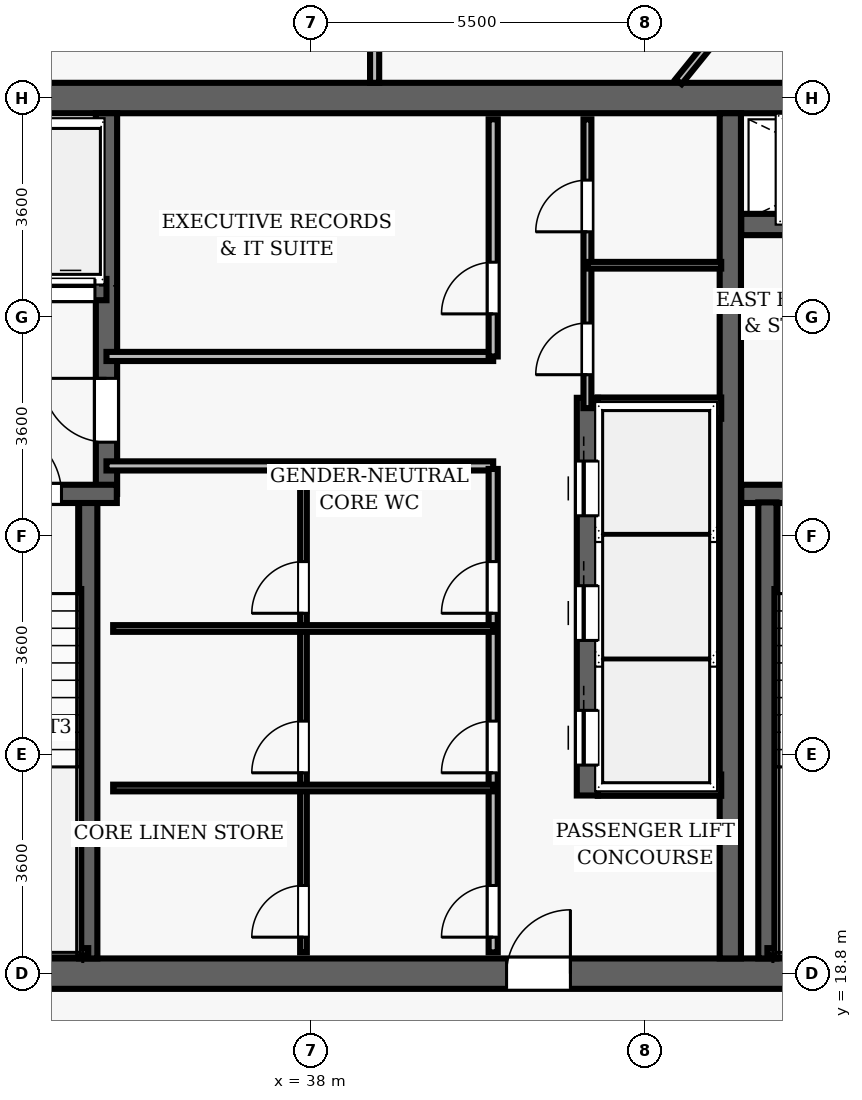
"""IFC4 building model, lengths in metres.
Left out: names, types, materials, properties, quantities, classifications, styles, units other than length and angle.
Written with IfcOpenShell. Run it as: python <this file> out.ifc"""

import sys

from ifc_helpers import new_model, si_unit, direction, frame, frame_2d, origin, place, context, subcontext, project, spatial, rectangle, extrude, element, fill, save


model = new_model("IFC4")
c1 = context("Model", 3, precision=1e-05, world=origin(), true_north=direction((0.0, 1.0)))
c2 = subcontext(c1, "Body", "Model", "MODEL_VIEW")
j1 = project(units=[si_unit("LENGTHUNIT", "METRE"), si_unit("PLANEANGLEUNIT", "RADIAN")], contexts=[c1])
p1 = place(None, origin())
s1 = spatial("IfcSite", under=j1, at=p1, CompositionType="ELEMENT")
p2 = place(p1, origin())
s2 = spatial("IfcBuilding", under=s1, at=p2, CompositionType="ELEMENT")
p3 = place(p2, frame((0.0, 0.0, 245.9)))
s3 = spatial("IfcBuildingStorey", under=s2, at=p3, CompositionType="ELEMENT", Elevation=245.9)
p4 = place(p3, frame((26.75, 18.8, 0.0), z_axis=(0.0, 0.0, 1.0), x_axis=(1.0, 0.0, 0.0)))
e1 = element("IfcWall", 1, at=p4, inside=s3, PredefinedType="SHEAR", context=c2, shape_type="SweptSolid", body=[
    extrude(rectangle(XDim=22.5, YDim=0.5, at=frame_2d((11.25, 0.0))), origin(), (0.0, 0.0, 1.0), 3.85),
])
p5 = place(p4, frame((14.47, 0.0, 0.0)))
e2 = element("IfcOpeningElement", 2, at=p5, cuts=e1, PredefinedType="OPENING", context=c2, shape_type="SweptSolid", body=[
    extrude(rectangle(XDim=1.05, YDim=2.15, at=frame_2d((0.525, 1.075))), frame((0.0, 0.26, 0.0), z_axis=(0.0, -1.0, 0.0), x_axis=(1.0, 0.0, 0.0)), (0.0, 0.0, 1.0), 0.52),
])
p6 = place(p3, frame((26.75, 33.2, 0.0), z_axis=(0.0, 0.0, 1.0), x_axis=(1.0, 0.0, 0.0)))
e3 = element("IfcWall", 3, at=p6, inside=s3, PredefinedType="SHEAR", context=c2, shape_type="SweptSolid", body=[
    extrude(rectangle(XDim=22.5, YDim=0.5, at=frame_2d((11.25, 0.0))), origin(), (0.0, 0.0, 1.0), 3.85),
])
p7 = place(p3, frame((44.9, 19.05, 0.0), z_axis=(0.0, 0.0, 1.0), x_axis=(0.0, 1.0, 0.0)))
e4 = element("IfcWall", 4, at=p7, inside=s3, PredefinedType="SHEAR", context=c2, shape_type="SweptSolid", body=[
    extrude(rectangle(XDim=13.9, YDim=0.35, at=frame_2d((6.95, 0.0))), origin(), (0.0, 0.0, 1.0), 3.85),
])
p8 = place(p3, frame((45.08, 26.69, 0.0), z_axis=(0.0, 0.0, 1.0), x_axis=(1.0, 0.0, 0.0)))
e5 = element("IfcWall", 5, at=p8, inside=s3, PredefinedType="SHEAR", context=c2, shape_type="SweptSolid", body=[
    extrude(rectangle(XDim=3.67, YDim=0.3, at=frame_2d((1.835, 0.0))), origin(), (0.0, 0.0, 1.0), 3.85),
])
p9 = place(p8, frame((1.05, 0.0, 0.0)))
e6 = element("IfcOpeningElement", 6, at=p9, cuts=e5, PredefinedType="OPENING", context=c2, shape_type="SweptSolid", body=[
    extrude(rectangle(XDim=1.1, YDim=2.15, at=frame_2d((0.55, 1.075))), frame((0.0, 0.16, 0.0), z_axis=(0.0, -1.0, 0.0), x_axis=(1.0, 0.0, 0.0)), (0.0, 0.0, 1.0), 0.32),
])
p10 = place(p3, frame((45.51, 19.05, 0.0), z_axis=(0.0, 0.0, 1.0), x_axis=(0.0, 1.0, 0.0)))
e7 = element("IfcWall", 7, at=p10, inside=s3, PredefinedType="SHEAR", context=c2, shape_type="SweptSolid", body=[
    extrude(rectangle(XDim=7.5, YDim=0.3, at=frame_2d((3.75, 0.0))), origin(), (0.0, 0.0, 1.0), 3.85),
])
p11 = place(p3, frame((45.51, 19.16, 0.0), z_axis=(0.0, 0.0, 1.0), x_axis=(1.0, 0.0, 0.0)))
e8 = element("IfcWall", 8, at=p11, inside=s3, PredefinedType="SHEAR", context=c2, shape_type="SweptSolid", body=[
    extrude(rectangle(XDim=3.095, YDim=0.12, at=frame_2d((1.547, 0.0))), origin(), (0.0, 0.0, 1.0), 3.85),
])
p12 = place(p3, frame((45.08, 31.12, 0.0), z_axis=(0.0, 0.0, 1.0), x_axis=(1.0, 0.0, 0.0)))
e9 = element("IfcWall", 9, at=p12, inside=s3, PredefinedType="SHEAR", context=c2, shape_type="SweptSolid", body=[
    extrude(rectangle(XDim=3.67, YDim=0.35, at=frame_2d((1.835, 0.0))), origin(), (0.0, 0.0, 1.0), 3.04),
])
p13 = place(p12, frame((1.25, 0.0, 0.0)))
e10 = element("IfcOpeningElement", 10, at=p13, cuts=e9, PredefinedType="OPENING", context=c2, shape_type="SweptSolid", body=[
    extrude(rectangle(XDim=1.1, YDim=2.15, at=frame_2d((0.55, 1.075))), frame((0.0, 0.185, 0.0), z_axis=(0.0, -1.0, 0.0), x_axis=(1.0, 0.0, 0.0)), (0.0, 0.0, 1.0), 0.37),
])
p14 = place(p3, frame((34.34, 19.05, 0.0), z_axis=(0.0, 0.0, 1.0), x_axis=(0.0, 1.0, 0.0)))
e11 = element("IfcWall", 11, at=p14, inside=s3, PredefinedType="SHEAR", context=c2, shape_type="SweptSolid", body=[
    extrude(rectangle(XDim=7.5, YDim=0.3, at=frame_2d((3.75, 0.0))), origin(), (0.0, 0.0, 1.0), 3.85),
])
p15 = place(p3, frame((34.64, 26.69, 0.0), z_axis=(0.0, 0.0, 1.0), x_axis=(0.0, 1.0, 0.0)))
e12 = element("IfcWall", 12, at=p15, inside=s3, PredefinedType="SHEAR", context=c2, shape_type="SweptSolid", body=[
    extrude(rectangle(XDim=6.26, YDim=0.35, at=frame_2d((3.13, 0.0))), origin(), (0.0, 0.0, 1.0), 3.85),
])
p16 = place(p15, frame((0.85, 0.0, 0.0)))
e13 = element("IfcOpeningElement", 13, at=p16, cuts=e12, PredefinedType="OPENING", context=c2, shape_type="SweptSolid", body=[
    extrude(rectangle(XDim=1.05, YDim=2.15, at=frame_2d((0.525, 1.075))), frame((0.0, 0.185, 0.0), z_axis=(0.0, -1.0, 0.0), x_axis=(1.0, 0.0, 0.0)), (0.0, 0.0, 1.0), 0.37),
])
p17 = place(p3, frame((31.25, 26.69, 0.0), z_axis=(0.0, 0.0, 1.0), x_axis=(1.0, 0.0, 0.0)))
e14 = element("IfcWall", 14, at=p17, inside=s3, PredefinedType="SHEAR", context=c2, shape_type="SweptSolid", body=[
    extrude(rectangle(XDim=3.56, YDim=0.3, at=frame_2d((1.78, 0.0))), origin(), (0.0, 0.0, 1.0), 3.85),
])
p18 = place(p17, frame((1.55, 0.0, 0.0)))
e15 = element("IfcOpeningElement", 15, at=p18, cuts=e14, PredefinedType="OPENING", context=c2, shape_type="SweptSolid", body=[
    extrude(rectangle(XDim=1.1, YDim=2.15, at=frame_2d((0.55, 1.075))), frame((0.0, 0.16, 0.0), z_axis=(0.0, -1.0, 0.0), x_axis=(1.0, 0.0, 0.0)), (0.0, 0.0, 1.0), 0.32),
])
p19 = place(p3, frame((31.3, 19.16, 0.0), z_axis=(0.0, 0.0, 1.0), x_axis=(1.0, 0.0, 0.0)))
e16 = element("IfcWall", 16, at=p19, inside=s3, PredefinedType="SHEAR", context=c2, shape_type="SweptSolid", body=[
    extrude(rectangle(XDim=3.04, YDim=0.12, at=frame_2d((1.52, 0.0))), origin(), (0.0, 0.0, 1.0), 3.85),
])
p20 = place(p3, frame((32.23, 30.05, 0.0), z_axis=(0.0, 0.0, 1.0), x_axis=(1.0, 0.0, 0.0)))
e17 = element("IfcWall", 17, at=p20, inside=s3, PredefinedType="SHEAR", context=c2, shape_type="SweptSolid", body=[
    extrude(rectangle(XDim=2.41, YDim=0.35, at=frame_2d((1.205, 0.0))), origin(), (0.0, 0.0, 1.0), 3.04),
])
p21 = place(p20, frame((0.42, 0.0, 0.0)))
e18 = element("IfcOpeningElement", 18, at=p21, cuts=e17, PredefinedType="OPENING", context=c2, shape_type="SweptSolid", body=[
    extrude(rectangle(XDim=0.8, YDim=2.15, at=frame_2d((0.4, 1.075))), frame((0.0, 0.185, 0.0), z_axis=(0.0, -1.0, 0.0), x_axis=(1.0, 0.0, 0.0)), (0.0, 0.0, 1.0), 0.37),
])
p22 = place(p20, frame((1.42, 0.0, 0.0)))
e19 = element("IfcOpeningElement", 19, at=p22, cuts=e17, PredefinedType="OPENING", context=c2, shape_type="SweptSolid", body=[
    extrude(rectangle(XDim=0.8, YDim=2.15, at=frame_2d((0.4, 1.075))), frame((0.0, 0.185, 0.0), z_axis=(0.0, -1.0, 0.0), x_axis=(1.0, 0.0, 0.0)), (0.0, 0.0, 1.0), 0.37),
])
p23 = place(p3, frame((42.55, 21.73, 0.0), z_axis=(0.0, 0.0, 1.0), x_axis=(0.0, 1.0, 0.0)))
e20 = element("IfcWall", 20, at=p23, inside=s3, PredefinedType="SHEAR", context=c2, shape_type="SweptSolid", body=[
    extrude(rectangle(XDim=6.54, YDim=0.35, at=frame_2d((3.27, 0.0))), origin(), (0.0, 0.0, 1.0), 3.04),
])
p24 = place(p23, frame((0.5, 0.0, 0.0)))
e21 = element("IfcOpeningElement", 21, at=p24, cuts=e20, PredefinedType="OPENING", context=c2, shape_type="SweptSolid", body=[
    extrude(rectangle(XDim=0.9, YDim=2.15, at=frame_2d((0.45, 1.075))), frame((0.0, 0.185, 0.0), z_axis=(0.0, -1.0, 0.0), x_axis=(1.0, 0.0, 0.0)), (0.0, 0.0, 1.0), 0.37),
])
p25 = place(p23, frame((2.55, 0.0, 0.0)))
e22 = element("IfcOpeningElement", 22, at=p25, cuts=e20, PredefinedType="OPENING", context=c2, shape_type="SweptSolid", body=[
    extrude(rectangle(XDim=0.9, YDim=2.15, at=frame_2d((0.45, 1.075))), frame((0.0, 0.185, 0.0), z_axis=(0.0, -1.0, 0.0), x_axis=(1.0, 0.0, 0.0)), (0.0, 0.0, 1.0), 0.37),
])
p26 = place(p23, frame((4.6, 0.0, 0.0)))
e23 = element("IfcOpeningElement", 23, at=p26, cuts=e20, PredefinedType="OPENING", context=c2, shape_type="SweptSolid", body=[
    extrude(rectangle(XDim=0.9, YDim=2.15, at=frame_2d((0.45, 1.075))), frame((0.0, 0.185, 0.0), z_axis=(0.0, -1.0, 0.0), x_axis=(1.0, 0.0, 0.0)), (0.0, 0.0, 1.0), 0.37),
])
for number, where, z_axis, x_axis in (
    (24, (42.72, 21.9, 0.0), (0.0, 0.0, 1.0), (1.0, 0.0, 0.0)),
    (25, (42.72, 28.1, 0.0), (0.0, 0.0, 1.0), (1.0, 0.0, 0.0)),
):
    element("IfcWall", number, at=place(p3, frame(where, z_axis=z_axis, x_axis=x_axis)), inside=s3, PredefinedType="SHEAR", context=c2, shape_type="SweptSolid", body=[
        extrude(rectangle(XDim=2.03, YDim=0.35, at=frame_2d((1.015, 0.0))), origin(), (0.0, 0.0, 1.0), 3.04),
    ])
for number, where, z_axis, x_axis in (
    (26, (34.64, 27.15, 0.0), (0.0, 0.0, 1.0), (1.0, 0.0, 0.0)),
    (27, (34.64, 28.95, 0.0), (0.0, 0.0, 1.0), (1.0, 0.0, 0.0)),
):
    element("IfcWall", number, at=place(p3, frame(where, z_axis=z_axis, x_axis=x_axis)), inside=s3, PredefinedType="PARTITIONING", context=c2, shape_type="SweptSolid", body=[
        extrude(rectangle(XDim=6.36, YDim=0.15, at=frame_2d((3.18, 0.0))), origin(), (0.0, 0.0, 1.0), 3.04),
    ])
p27 = place(p3, frame((41.0, 28.95, 0.0), z_axis=(0.0, 0.0, 1.0), x_axis=(0.0, 1.0, 0.0)))
e28 = element("IfcWall", 28, at=p27, inside=s3, PredefinedType="PARTITIONING", context=c2, shape_type="SweptSolid", body=[
    extrude(rectangle(XDim=3.9, YDim=0.15, at=frame_2d((1.95, 0.0))), origin(), (0.0, 0.0, 1.0), 3.04),
])
p28 = place(p27, frame((0.7, 0.0, 0.0)))
e29 = element("IfcOpeningElement", 29, at=p28, cuts=e28, PredefinedType="OPENING", context=c2, shape_type="SweptSolid", body=[
    extrude(rectangle(XDim=0.85, YDim=2.1, at=frame_2d((0.425, 1.05))), frame((0.0, 0.085, 0.0), z_axis=(0.0, -1.0, 0.0), x_axis=(1.0, 0.0, 0.0)), (0.0, 0.0, 1.0), 0.17),
])
p29 = place(p3, frame((41.0, 19.15, 0.0), z_axis=(0.0, 0.0, 1.0), x_axis=(0.0, 1.0, 0.0)))
e30 = element("IfcWall", 30, at=p29, inside=s3, PredefinedType="PARTITIONING", context=c2, shape_type="SweptSolid", body=[
    extrude(rectangle(XDim=7.95, YDim=0.15, at=frame_2d((3.975, 0.0))), origin(), (0.0, 0.0, 1.0), 3.04),
])
p30 = place(p29, frame((0.25, 0.0, 0.0)))
e31 = element("IfcOpeningElement", 31, at=p30, cuts=e30, PredefinedType="OPENING", context=c2, shape_type="SweptSolid", body=[
    extrude(rectangle(XDim=0.85, YDim=2.1, at=frame_2d((0.425, 1.05))), frame((0.0, 0.085, 0.0), z_axis=(0.0, -1.0, 0.0), x_axis=(1.0, 0.0, 0.0)), (0.0, 0.0, 1.0), 0.17),
])
p31 = place(p29, frame((2.953, 0.0, 0.0)))
e32 = element("IfcOpeningElement", 32, at=p31, cuts=e30, PredefinedType="OPENING", context=c2, shape_type="SweptSolid", body=[
    extrude(rectangle(XDim=0.85, YDim=2.1, at=frame_2d((0.425, 1.05))), frame((0.0, 0.085, 0.0), z_axis=(0.0, -1.0, 0.0), x_axis=(1.0, 0.0, 0.0)), (0.0, 0.0, 1.0), 0.17),
])
p32 = place(p29, frame((5.576, 0.0, 0.0)))
e33 = element("IfcOpeningElement", 33, at=p32, cuts=e30, PredefinedType="OPENING", context=c2, shape_type="SweptSolid", body=[
    extrude(rectangle(XDim=0.85, YDim=2.1, at=frame_2d((0.425, 1.05))), frame((0.0, 0.085, 0.0), z_axis=(0.0, -1.0, 0.0), x_axis=(1.0, 0.0, 0.0)), (0.0, 0.0, 1.0), 0.17),
])
p33 = place(p3, frame((37.88, 19.15, 0.0), z_axis=(0.0, 0.0, 1.0), x_axis=(0.0, 1.0, 0.0)))
e34 = element("IfcWall", 34, at=p33, inside=s3, PredefinedType="PARTITIONING", context=c2, shape_type="SweptSolid", body=[
    extrude(rectangle(XDim=7.95, YDim=0.11, at=frame_2d((3.975, 0.0))), origin(), (0.0, 0.0, 1.0), 3.04),
])
p34 = place(p33, frame((0.25, 0.0, 0.0)))
e35 = element("IfcOpeningElement", 35, at=p34, cuts=e34, PredefinedType="OPENING", context=c2, shape_type="SweptSolid", body=[
    extrude(rectangle(XDim=0.85, YDim=2.1, at=frame_2d((0.425, 1.05))), frame((0.0, 0.065, 0.0), z_axis=(0.0, -1.0, 0.0), x_axis=(1.0, 0.0, 0.0)), (0.0, 0.0, 1.0), 0.13),
])
p35 = place(p33, frame((2.953, 0.0, 0.0)))
e36 = element("IfcOpeningElement", 36, at=p35, cuts=e34, PredefinedType="OPENING", context=c2, shape_type="SweptSolid", body=[
    extrude(rectangle(XDim=0.85, YDim=2.1, at=frame_2d((0.425, 1.05))), frame((0.0, 0.065, 0.0), z_axis=(0.0, -1.0, 0.0), x_axis=(1.0, 0.0, 0.0)), (0.0, 0.0, 1.0), 0.13),
])
p36 = place(p33, frame((5.576, 0.0, 0.0)))
e37 = element("IfcOpeningElement", 37, at=p36, cuts=e34, PredefinedType="OPENING", context=c2, shape_type="SweptSolid", body=[
    extrude(rectangle(XDim=0.85, YDim=2.1, at=frame_2d((0.425, 1.05))), frame((0.0, 0.065, 0.0), z_axis=(0.0, -1.0, 0.0), x_axis=(1.0, 0.0, 0.0)), (0.0, 0.0, 1.0), 0.13),
])
for number, where, z_axis, x_axis in (
    (38, (34.75, 21.853, 0.0), (0.0, 0.0, 1.0), (1.0, 0.0, 0.0)),
    (39, (34.75, 24.477, 0.0), (0.0, 0.0, 1.0), (1.0, 0.0, 0.0)),
):
    element("IfcWall", number, at=place(p3, frame(where, z_axis=z_axis, x_axis=x_axis)), inside=s3, PredefinedType="PARTITIONING", context=c2, shape_type="SweptSolid", body=[
        extrude(rectangle(XDim=6.25, YDim=0.11, at=frame_2d((3.125, 0.0))), origin(), (0.0, 0.0, 1.0), 3.04),
    ])
p37 = place(p3, frame((42.55, 28.1, 0.0), z_axis=(0.0, 0.0, 1.0), x_axis=(0.0, 1.0, 0.0)))
e40 = element("IfcWall", 40, at=p37, inside=s3, PredefinedType="PARTITIONING", context=c2, shape_type="SweptSolid", body=[
    extrude(rectangle(XDim=4.75, YDim=0.13, at=frame_2d((2.375, 0.0))), origin(), (0.0, 0.0, 1.0), 3.04),
])
p38 = place(p37, frame((0.55, 0.0, 0.0)))
e41 = element("IfcOpeningElement", 41, at=p38, cuts=e40, PredefinedType="OPENING", context=c2, shape_type="SweptSolid", body=[
    extrude(rectangle(XDim=0.85, YDim=2.1, at=frame_2d((0.425, 1.05))), frame((0.0, 0.075, 0.0), z_axis=(0.0, -1.0, 0.0), x_axis=(1.0, 0.0, 0.0)), (0.0, 0.0, 1.0), 0.15),
])
p39 = place(p37, frame((2.9, 0.0, 0.0)))
e42 = element("IfcOpeningElement", 42, at=p39, cuts=e40, PredefinedType="OPENING", context=c2, shape_type="SweptSolid", body=[
    extrude(rectangle(XDim=0.85, YDim=2.1, at=frame_2d((0.425, 1.05))), frame((0.0, 0.075, 0.0), z_axis=(0.0, -1.0, 0.0), x_axis=(1.0, 0.0, 0.0)), (0.0, 0.0, 1.0), 0.15),
])
p40 = place(p3, frame((42.55, 30.45, 0.0), z_axis=(0.0, 0.0, 1.0), x_axis=(1.0, 0.0, 0.0)))
e43 = element("IfcWall", 43, at=p40, inside=s3, PredefinedType="PARTITIONING", context=c2, shape_type="SweptSolid", body=[
    extrude(rectangle(XDim=2.2, YDim=0.11, at=frame_2d((1.1, 0.0))), origin(), (0.0, 0.0, 1.0), 3.04),
])
p41 = place(p3, frame((39.05, 33.45, 0.0), z_axis=(0.0, 0.0, 1.0), x_axis=(0.0, 1.0, 0.0)))
e44 = element("IfcWall", 44, at=p41, inside=s3, PredefinedType="PARTITIONING", context=c2, shape_type="SweptSolid", body=[
    extrude(rectangle(XDim=6.95, YDim=0.15, at=frame_2d((3.475, 0.0))), origin(), (0.0, 0.0, 1.0), 3.04),
])
p42 = place(p41, frame((1.262, 0.0, 0.0)))
e45 = element("IfcOpeningElement", 45, at=p42, cuts=e44, PredefinedType="OPENING", context=c2, shape_type="SweptSolid", body=[
    extrude(rectangle(XDim=0.95, YDim=2.15, at=frame_2d((0.475, 1.075))), frame((0.0, 0.085, 0.0), z_axis=(0.0, -1.0, 0.0), x_axis=(1.0, 0.0, 0.0)), (0.0, 0.0, 1.0), 0.17),
])
p43 = place(p3, frame((44.049, 33.47, 0.0), z_axis=(0.0, 0.0, 1.0), x_axis=(0.629319722443, 0.777146502883, 0.0)))
e46 = element("IfcWall", 46, at=p43, inside=s3, PredefinedType="PARTITIONING", context=c2, shape_type="SweptSolid", body=[
    extrude(rectangle(XDim=7.803, YDim=0.13, at=frame_2d((3.902, 0.0))), origin(), (0.0, 0.0, 1.0), 3.04),
])
p44 = place(p18, origin())
e47 = element("IfcDoor", 47, at=p44, inside=s3, OperationType="SINGLE_SWING_LEFT", PredefinedType="DOOR", context=c2, shape_type="SweptSolid", body=[
    extrude(rectangle(XDim=1.1, YDim=2.15, at=frame_2d((0.55, 1.075))), frame((0.0, 0.025, 0.0), z_axis=(0.0, -1.0, 0.0), x_axis=(1.0, 0.0, 0.0)), (0.0, 0.0, 1.0), 0.05),
])
fill(e15, e47)
p45 = place(p5, origin())
e48 = element("IfcDoor", 48, at=p45, inside=s3, OperationType="SINGLE_SWING_RIGHT", PredefinedType="DOOR", context=c2, shape_type="SweptSolid", body=[
    extrude(rectangle(XDim=1.05, YDim=2.15, at=frame_2d((0.525, 1.075))), frame((0.0, 0.025, 0.0), z_axis=(0.0, -1.0, 0.0), x_axis=(1.0, 0.0, 0.0)), (0.0, 0.0, 1.0), 0.05),
])
fill(e2, e48)
p46 = place(p16, origin())
e49 = element("IfcDoor", 49, at=p46, inside=s3, OperationType="SINGLE_SWING_RIGHT", PredefinedType="DOOR", context=c2, shape_type="SweptSolid", body=[
    extrude(rectangle(XDim=1.05, YDim=2.15, at=frame_2d((0.525, 1.075))), frame((0.0, 0.025, 0.0), z_axis=(0.0, -1.0, 0.0), x_axis=(1.0, 0.0, 0.0)), (0.0, 0.0, 1.0), 0.05),
])
fill(e13, e49)
p47 = place(p28, origin())
e50 = element("IfcDoor", 50, at=p47, inside=s3, OperationType="SINGLE_SWING_LEFT", PredefinedType="DOOR", context=c2, shape_type="SweptSolid", body=[
    extrude(rectangle(XDim=0.85, YDim=2.1, at=frame_2d((0.425, 1.05))), frame((0.0, 0.025, 0.0), z_axis=(0.0, -1.0, 0.0), x_axis=(1.0, 0.0, 0.0)), (0.0, 0.0, 1.0), 0.05),
])
fill(e29, e50)
p48 = place(p30, origin())
e51 = element("IfcDoor", 51, at=p48, inside=s3, OperationType="SINGLE_SWING_LEFT", PredefinedType="DOOR", context=c2, shape_type="SweptSolid", body=[
    extrude(rectangle(XDim=0.85, YDim=2.1, at=frame_2d((0.425, 1.05))), frame((0.0, 0.025, 0.0), z_axis=(0.0, -1.0, 0.0), x_axis=(1.0, 0.0, 0.0)), (0.0, 0.0, 1.0), 0.05),
])
fill(e31, e51)
p49 = place(p34, origin())
e52 = element("IfcDoor", 52, at=p49, inside=s3, OperationType="SINGLE_SWING_LEFT", PredefinedType="DOOR", context=c2, shape_type="SweptSolid", body=[
    extrude(rectangle(XDim=0.85, YDim=2.1, at=frame_2d((0.425, 1.05))), frame((0.0, 0.025, 0.0), z_axis=(0.0, -1.0, 0.0), x_axis=(1.0, 0.0, 0.0)), (0.0, 0.0, 1.0), 0.05),
])
fill(e35, e52)
p50 = place(p31, origin())
e53 = element("IfcDoor", 53, at=p50, inside=s3, OperationType="SINGLE_SWING_LEFT", PredefinedType="DOOR", context=c2, shape_type="SweptSolid", body=[
    extrude(rectangle(XDim=0.85, YDim=2.1, at=frame_2d((0.425, 1.05))), frame((0.0, 0.025, 0.0), z_axis=(0.0, -1.0, 0.0), x_axis=(1.0, 0.0, 0.0)), (0.0, 0.0, 1.0), 0.05),
])
fill(e32, e53)
p51 = place(p35, origin())
e54 = element("IfcDoor", 54, at=p51, inside=s3, OperationType="SINGLE_SWING_LEFT", PredefinedType="DOOR", context=c2, shape_type="SweptSolid", body=[
    extrude(rectangle(XDim=0.85, YDim=2.1, at=frame_2d((0.425, 1.05))), frame((0.0, 0.025, 0.0), z_axis=(0.0, -1.0, 0.0), x_axis=(1.0, 0.0, 0.0)), (0.0, 0.0, 1.0), 0.05),
])
fill(e36, e54)
p52 = place(p32, origin())
e55 = element("IfcDoor", 55, at=p52, inside=s3, OperationType="SINGLE_SWING_LEFT", PredefinedType="DOOR", context=c2, shape_type="SweptSolid", body=[
    extrude(rectangle(XDim=0.85, YDim=2.1, at=frame_2d((0.425, 1.05))), frame((0.0, 0.025, 0.0), z_axis=(0.0, -1.0, 0.0), x_axis=(1.0, 0.0, 0.0)), (0.0, 0.0, 1.0), 0.05),
])
fill(e33, e55)
p53 = place(p36, origin())
e56 = element("IfcDoor", 56, at=p53, inside=s3, OperationType="SINGLE_SWING_LEFT", PredefinedType="DOOR", context=c2, shape_type="SweptSolid", body=[
    extrude(rectangle(XDim=0.85, YDim=2.1, at=frame_2d((0.425, 1.05))), frame((0.0, 0.025, 0.0), z_axis=(0.0, -1.0, 0.0), x_axis=(1.0, 0.0, 0.0)), (0.0, 0.0, 1.0), 0.05),
])
fill(e37, e56)
p54 = place(p38, origin())
e57 = element("IfcDoor", 57, at=p54, inside=s3, OperationType="SINGLE_SWING_LEFT", PredefinedType="DOOR", context=c2, shape_type="SweptSolid", body=[
    extrude(rectangle(XDim=0.85, YDim=2.1, at=frame_2d((0.425, 1.05))), frame((0.0, 0.025, 0.0), z_axis=(0.0, -1.0, 0.0), x_axis=(1.0, 0.0, 0.0)), (0.0, 0.0, 1.0), 0.05),
])
fill(e41, e57)
p55 = place(p39, origin())
e58 = element("IfcDoor", 58, at=p55, inside=s3, OperationType="SINGLE_SWING_LEFT", PredefinedType="DOOR", context=c2, shape_type="SweptSolid", body=[
    extrude(rectangle(XDim=0.85, YDim=2.1, at=frame_2d((0.425, 1.05))), frame((0.0, 0.025, 0.0), z_axis=(0.0, -1.0, 0.0), x_axis=(1.0, 0.0, 0.0)), (0.0, 0.0, 1.0), 0.05),
])
fill(e42, e58)
p56 = place(p24, origin())
e59 = element("IfcDoor", 59, at=p56, inside=s3, OperationType="SLIDING_TO_LEFT", PredefinedType="DOOR", context=c2, shape_type="SweptSolid", body=[
    extrude(rectangle(XDim=0.9, YDim=2.15, at=frame_2d((0.45, 1.075))), frame((0.0, 0.025, 0.0), z_axis=(0.0, -1.0, 0.0), x_axis=(1.0, 0.0, 0.0)), (0.0, 0.0, 1.0), 0.05),
])
fill(e21, e59)
p57 = place(p25, origin())
e60 = element("IfcDoor", 60, at=p57, inside=s3, OperationType="SLIDING_TO_LEFT", PredefinedType="DOOR", context=c2, shape_type="SweptSolid", body=[
    extrude(rectangle(XDim=0.9, YDim=2.15, at=frame_2d((0.45, 1.075))), frame((0.0, 0.025, 0.0), z_axis=(0.0, -1.0, 0.0), x_axis=(1.0, 0.0, 0.0)), (0.0, 0.0, 1.0), 0.05),
])
fill(e22, e60)
p58 = place(p26, origin())
e61 = element("IfcDoor", 61, at=p58, inside=s3, OperationType="SLIDING_TO_LEFT", PredefinedType="DOOR", context=c2, shape_type="SweptSolid", body=[
    extrude(rectangle(XDim=0.9, YDim=2.15, at=frame_2d((0.45, 1.075))), frame((0.0, 0.025, 0.0), z_axis=(0.0, -1.0, 0.0), x_axis=(1.0, 0.0, 0.0)), (0.0, 0.0, 1.0), 0.05),
])
fill(e23, e61)
p59 = place(p22, origin())
e62 = element("IfcDoor", 62, at=p59, inside=s3, OperationType="SLIDING_TO_LEFT", PredefinedType="DOOR", context=c2, shape_type="SweptSolid", body=[
    extrude(rectangle(XDim=0.8, YDim=2.15, at=frame_2d((0.4, 1.075))), frame((0.0, 0.025, 0.0), z_axis=(0.0, -1.0, 0.0), x_axis=(1.0, 0.0, 0.0)), (0.0, 0.0, 1.0), 0.05),
])
fill(e19, e62)
save(model, sys.argv[1])
